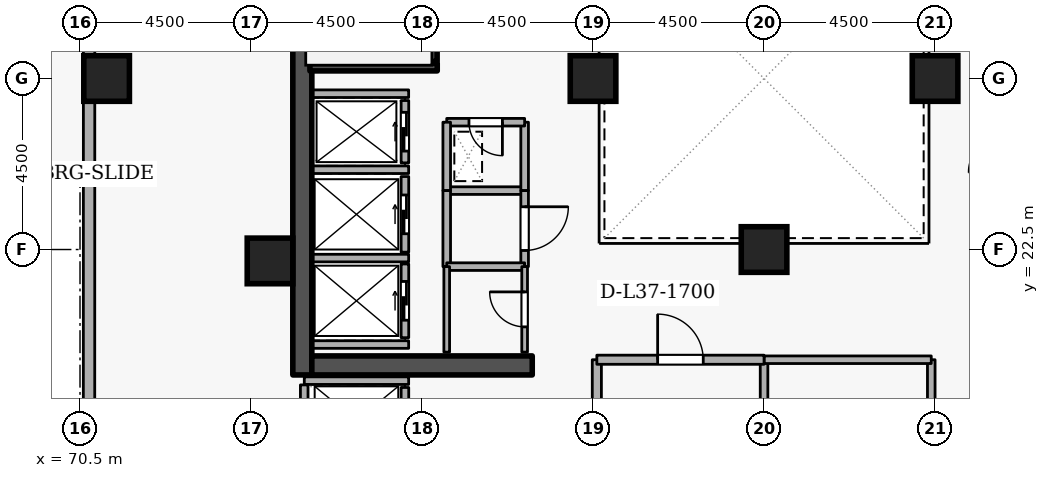
"""IFC4 building model, lengths in metres.
Left out: names, types, materials, properties, quantities, classifications, styles, units other than length and angle.
Written with IfcOpenShell. Run it as: python <this file> out.ifc"""

import sys

from ifc_helpers import new_model, si_unit, direction, frame, frame_2d, origin, origin_2d, place, context, subcontext, project, spatial, rectangle, extrude, element, fill, save


model = new_model("IFC4")
c1 = context("Model", 3, precision=1e-05, world=origin(), true_north=direction((0.0, 1.0)))
c2 = subcontext(c1, "Body", "Model", "MODEL_VIEW")
j1 = project(units=[si_unit("LENGTHUNIT", "METRE"), si_unit("PLANEANGLEUNIT", "RADIAN")], contexts=[c1])
p1 = place(None, origin())
s1 = spatial("IfcSite", under=j1, at=p1, CompositionType="ELEMENT")
p2 = place(p1, origin())
s2 = spatial("IfcBuilding", under=s1, at=p2, CompositionType="ELEMENT")
p3 = place(p2, frame((0.0, 0.0, 141.3)))
s3 = spatial("IfcBuildingStorey", under=s2, at=p3, CompositionType="ELEMENT", Elevation=141.3)
p4 = place(p3, frame((76.35, 19.2, 0.0), z_axis=(0.0, 0.0, 1.0), x_axis=(0.0, 1.0, 0.0)))
e1 = element("IfcWall", 1, at=p4, inside=s3, PredefinedType="SHEAR", context=c2, shape_type="SweptSolid", body=[
    extrude(rectangle(XDim=15.6, YDim=0.5, at=frame_2d((7.8, 0.0))), origin(), (0.0, 0.0, 1.0), 4.2),
])
p5 = place(p3, frame((76.6, 19.45, 0.0), z_axis=(0.0, 0.0, 1.0), x_axis=(1.0, 0.0, 0.0)))
e2 = element("IfcWall", 2, at=p5, inside=s3, PredefinedType="SHEAR", context=c2, shape_type="SweptSolid", body=[
    extrude(rectangle(XDim=5.8, YDim=0.5, at=frame_2d((2.9, 0.0))), origin(), (0.0, 0.0, 1.0), 4.2),
])
for number, where, z_axis, x_axis in (
    (3, (71.2, 27.0, 0.0), (0.0, 0.0, 1.0), (1.0, 0.0, 0.0)),
    (4, (75.5, 22.2, 0.0), (0.0, 0.0, 1.0), (1.0, 0.0, 0.0)),
    (5, (93.0, 27.0, 0.0), (0.0, 0.0, 1.0), (1.0, 0.0, 0.0)),
    (6, (84.0, 27.0, 0.0), (0.0, 0.0, 1.0), (1.0, 0.0, 0.0)),
    (7, (88.5, 22.5, 0.0), (0.0, 0.0, 1.0), (1.0, 0.0, 0.0)),
):
    element("IfcColumn", number, at=place(p3, frame(where, z_axis=z_axis, x_axis=x_axis)), inside=s3, PredefinedType="COLUMN", context=c2, shape_type="SweptSolid", body=[
        extrude(rectangle(XDim=1.2, YDim=1.2, at=origin_2d()), origin(), (0.0, 0.0, 1.0), 4.2),
    ])
p6 = place(p3, frame((70.741, 40.388, 0.0), z_axis=(0.0, 0.0, 1.0), x_axis=(-0.000169493917, -0.999999985636, 0.0)))
e8 = element("IfcWall", 8, at=p6, inside=s3, PredefinedType="STANDARD", context=c2, shape_type="SweptSolid", body=[
    extrude(rectangle(XDim=34.57, YDim=0.3, at=frame_2d((17.285, 0.0))), origin(), (0.0, 0.0, 1.0), 3.3),
])
p7 = place(p6, frame((11.364, 0.0, 0.0)))
e9 = element("IfcOpeningElement", 9, at=p7, cuts=e8, PredefinedType="OPENING", context=c2, shape_type="SweptSolid", body=[
    extrude(rectangle(XDim=1.15, YDim=2.1, at=frame_2d((0.575, 1.05))), frame((0.0, 0.16, 0.0), z_axis=(0.0, -1.0, 0.0), x_axis=(1.0, 0.0, 0.0)), (0.0, 0.0, 1.0), 0.32),
])
p8 = place(p6, frame((7.5, 0.0, 0.72)))
e10 = element("IfcOpeningElement", 10, at=p8, cuts=e8, PredefinedType="OPENING", context=c2, shape_type="SweptSolid", body=[
    extrude(rectangle(XDim=0.9, YDim=1.75, at=frame_2d((0.45, 0.875))), frame((0.0, 0.16, 0.0), z_axis=(0.0, -1.0, 0.0), x_axis=(1.0, 0.0, 0.0)), (0.0, 0.0, 1.0), 0.32),
])
p9 = place(p6, frame((21.9, 0.0, 0.72)))
e11 = element("IfcOpeningElement", 11, at=p9, cuts=e8, PredefinedType="OPENING", context=c2, shape_type="SweptSolid", body=[
    extrude(rectangle(XDim=0.9, YDim=1.75, at=frame_2d((0.45, 0.875))), frame((0.0, 0.16, 0.0), z_axis=(0.0, -1.0, 0.0), x_axis=(1.0, 0.0, 0.0)), (0.0, 0.0, 1.0), 0.32),
])
p10 = place(p6, frame((31.5, 0.0, 0.72)))
e12 = element("IfcOpeningElement", 12, at=p10, cuts=e8, PredefinedType="OPENING", context=c2, shape_type="SweptSolid", body=[
    extrude(rectangle(XDim=0.9, YDim=1.75, at=frame_2d((0.45, 0.875))), frame((0.0, 0.16, 0.0), z_axis=(0.0, -1.0, 0.0), x_axis=(1.0, 0.0, 0.0)), (0.0, 0.0, 1.0), 0.32),
])
p11 = place(p3, frame((79.05, 24.78, 0.0), z_axis=(0.0, 0.0, 1.0), x_axis=(0.0, 1.0, 0.0)))
e13 = element("IfcWall", 13, at=p11, inside=s3, PredefinedType="STANDARD", context=c2, shape_type="SweptSolid", body=[
    extrude(rectangle(XDim=1.64, YDim=0.2, at=frame_2d((0.82, 0.0))), origin(), (0.0, 0.0, 1.0), 3.94),
])
p12 = place(p11, frame((0.31, 0.0, 0.0)))
e14 = element("IfcOpeningElement", 14, at=p12, cuts=e13, PredefinedType="OPENING", context=c2, shape_type="SweptSolid", body=[
    extrude(rectangle(XDim=1.02, YDim=2.06, at=frame_2d((0.51, 1.03))), frame((0.0, 0.11, 0.0), z_axis=(0.0, -1.0, 0.0), x_axis=(1.0, 0.0, 0.0)), (0.0, 0.0, 1.0), 0.22),
])
p13 = place(p3, frame((79.05, 22.43, 0.0), z_axis=(0.0, 0.0, 1.0), x_axis=(0.0, 1.0, 0.0)))
e15 = element("IfcWall", 15, at=p13, inside=s3, PredefinedType="STANDARD", context=c2, shape_type="SweptSolid", body=[
    extrude(rectangle(XDim=1.99, YDim=0.2, at=frame_2d((0.995, 0.0))), origin(), (0.0, 0.0, 1.0), 3.94),
])
p14 = place(p13, frame((0.485, 0.0, 0.0)))
e16 = element("IfcOpeningElement", 16, at=p14, cuts=e15, PredefinedType="OPENING", context=c2, shape_type="SweptSolid", body=[
    extrude(rectangle(XDim=1.02, YDim=2.06, at=frame_2d((0.51, 1.03))), frame((0.0, 0.11, 0.0), z_axis=(0.0, -1.0, 0.0), x_axis=(1.0, 0.0, 0.0)), (0.0, 0.0, 1.0), 0.22),
])
p15 = place(p3, frame((79.05, 20.18, 0.0), z_axis=(0.0, 0.0, 1.0), x_axis=(0.0, 1.0, 0.0)))
e17 = element("IfcWall", 17, at=p15, inside=s3, PredefinedType="STANDARD", context=c2, shape_type="SweptSolid", body=[
    extrude(rectangle(XDim=1.94, YDim=0.2, at=frame_2d((0.97, 0.0))), origin(), (0.0, 0.0, 1.0), 3.94),
])
p16 = place(p15, frame((0.46, 0.0, 0.0)))
e18 = element("IfcOpeningElement", 18, at=p16, cuts=e17, PredefinedType="OPENING", context=c2, shape_type="SweptSolid", body=[
    extrude(rectangle(XDim=1.02, YDim=2.06, at=frame_2d((0.51, 1.03))), frame((0.0, 0.11, 0.0), z_axis=(0.0, -1.0, 0.0), x_axis=(1.0, 0.0, 0.0)), (0.0, 0.0, 1.0), 0.22),
])
p17 = place(p3, frame((79.05, 17.13, 0.0), z_axis=(0.0, 0.0, 1.0), x_axis=(0.0, 1.0, 0.0)))
e19 = element("IfcWall", 19, at=p17, inside=s3, PredefinedType="STANDARD", context=c2, shape_type="SweptSolid", body=[
    extrude(rectangle(XDim=1.74, YDim=0.2, at=frame_2d((0.87, 0.0))), origin(), (0.0, 0.0, 1.0), 3.94),
])
p18 = place(p17, frame((0.36, 0.0, 0.0)))
e20 = element("IfcOpeningElement", 20, at=p18, cuts=e19, PredefinedType="OPENING", context=c2, shape_type="SweptSolid", body=[
    extrude(rectangle(XDim=1.02, YDim=2.06, at=frame_2d((0.51, 1.03))), frame((0.0, 0.11, 0.0), z_axis=(0.0, -1.0, 0.0), x_axis=(1.0, 0.0, 0.0)), (0.0, 0.0, 1.0), 0.22),
])
for number, where, z_axis, x_axis in (
    (21, (76.612, 26.6, 0.0), (0.0, 0.0, 1.0), (1.0, 0.0, 0.0)),
    (22, (76.612, 24.6, 0.0), (0.0, 0.0, 1.0), (1.0, 0.0, 0.0)),
    (23, (76.612, 22.275, 0.0), (0.0, 0.0, 1.0), (1.0, 0.0, 0.0)),
    (24, (76.612, 20.0, 0.0), (0.0, 0.0, 1.0), (1.0, 0.0, 0.0)),
):
    element("IfcWall", number, at=place(p3, frame(where, z_axis=z_axis, x_axis=x_axis)), inside=s3, PredefinedType="STANDARD", context=c2, shape_type="SweptSolid", body=[
        extrude(rectangle(XDim=2.536, YDim=0.2, at=frame_2d((1.268, 0.0))), origin(), (0.0, 0.0, 1.0), 3.94),
    ])
p19 = place(p3, frame((76.402, 19.05, 0.0), z_axis=(0.0, 0.0, 1.0), x_axis=(1.0, 0.0, 0.0)))
e25 = element("IfcWall", 25, at=p19, inside=s3, PredefinedType="STANDARD", context=c2, shape_type="SweptSolid", body=[
    extrude(rectangle(XDim=2.746, YDim=0.2, at=frame_2d((1.373, 0.0))), origin(), (0.0, 0.0, 1.0), 3.145),
])
p20 = place(p3, frame((76.4, 17.082, 0.0), z_axis=(0.0, 0.0, 1.0), x_axis=(0.0, 1.0, 0.0)))
e26 = element("IfcWall", 26, at=p20, inside=s3, PredefinedType="STANDARD", context=c2, shape_type="SweptSolid", body=[
    extrude(rectangle(XDim=1.856, YDim=0.2, at=frame_2d((0.928, 0.0))), origin(), (0.0, 0.0, 1.0), 3.94),
])
p21 = place(p3, frame((79.9, 27.3, 0.0), z_axis=(0.0, 0.0, 1.0), x_axis=(-1.0, 0.0, 0.0)))
e27 = element("IfcWall", 27, at=p21, inside=s3, PredefinedType="SHEAR", context=c2, shape_type="SweptSolid", body=[
    extrude(rectangle(XDim=3.35, YDim=0.2, at=frame_2d((1.675, 0.0))), origin(), (0.0, 0.0, 1.0), 4.2),
])
p22 = place(p3, frame((79.797, 27.45, 0.0), z_axis=(0.0, 0.0, 1.0), x_axis=(0.0, 1.0, 0.0)))
e28 = element("IfcWall", 28, at=p22, inside=s3, PredefinedType="SHEAR", context=c2, shape_type="SweptSolid", body=[
    extrude(rectangle(XDim=7.1, YDim=0.2, at=frame_2d((3.55, 0.0))), origin(), (0.0, 0.0, 1.0), 4.2),
])
p23 = place(p3, frame((80.15, 24.05, 0.0), z_axis=(0.0, 0.0, 1.0), x_axis=(1.0, 0.0, 0.0)))
e29 = element("IfcWall", 29, at=p23, inside=s3, PredefinedType="STANDARD", context=c2, shape_type="SweptSolid", body=[
    extrude(rectangle(XDim=2.05, YDim=0.2, at=frame_2d((1.025, 0.0))), origin(), (0.0, 0.0, 1.0), 3.94),
])
p24 = place(p3, frame((82.2, 24.05, 0.0), z_axis=(0.0, 0.0, 1.0), x_axis=(0.0, 1.0, 0.0)))
e30 = element("IfcWall", 30, at=p24, inside=s3, PredefinedType="STANDARD", context=c2, shape_type="SweptSolid", body=[
    extrude(rectangle(XDim=1.8, YDim=0.2, at=frame_2d((0.9, 0.0))), origin(), (0.0, 0.0, 1.0), 3.94),
])
p25 = place(p3, frame((82.2, 25.85, 0.0), z_axis=(0.0, 0.0, 1.0), x_axis=(-1.0, 0.0, 0.0)))
e31 = element("IfcWall", 31, at=p25, inside=s3, PredefinedType="STANDARD", context=c2, shape_type="SweptSolid", body=[
    extrude(rectangle(XDim=2.05, YDim=0.2, at=frame_2d((1.025, 0.0))), origin(), (0.0, 0.0, 1.0), 3.94),
])
p26 = place(p25, frame((0.585, 0.0, 0.0)))
e32 = element("IfcOpeningElement", 32, at=p26, cuts=e31, PredefinedType="OPENING", context=c2, shape_type="SweptSolid", body=[
    extrude(rectangle(XDim=0.88, YDim=2.04, at=frame_2d((0.44, 1.02))), frame((0.0, 0.11, 0.0), z_axis=(0.0, -1.0, 0.0), x_axis=(1.0, 0.0, 0.0)), (0.0, 0.0, 1.0), 0.22),
])
p27 = place(p3, frame((80.15, 25.85, 0.0), z_axis=(0.0, 0.0, 1.0), x_axis=(0.0, -1.0, 0.0)))
e33 = element("IfcWall", 33, at=p27, inside=s3, PredefinedType="STANDARD", context=c2, shape_type="SweptSolid", body=[
    extrude(rectangle(XDim=1.8, YDim=0.2, at=frame_2d((0.9, 0.0))), origin(), (0.0, 0.0, 1.0), 3.94),
])
p28 = place(p3, frame((80.15, 22.05, 0.0), z_axis=(0.0, 0.0, 1.0), x_axis=(0.0, 1.0, 0.0)))
e34 = element("IfcWall", 34, at=p28, inside=s3, PredefinedType="STANDARD", context=c2, shape_type="SweptSolid", body=[
    extrude(rectangle(XDim=2.0, YDim=0.2, at=frame_2d((1.0, 0.0))), origin(), (0.0, 0.0, 1.0), 3.94),
])
p29 = place(p3, frame((82.2, 24.05, 0.0), z_axis=(0.0, 0.0, 1.0), x_axis=(0.0, -1.0, 0.0)))
e35 = element("IfcWall", 35, at=p29, inside=s3, PredefinedType="STANDARD", context=c2, shape_type="SweptSolid", body=[
    extrude(rectangle(XDim=2.0, YDim=0.2, at=frame_2d((1.0, 0.0))), origin(), (0.0, 0.0, 1.0), 3.94),
])
p30 = place(p29, frame((0.425, 0.0, 0.0)))
e36 = element("IfcOpeningElement", 36, at=p30, cuts=e35, PredefinedType="OPENING", context=c2, shape_type="SweptSolid", body=[
    extrude(rectangle(XDim=1.15, YDim=2.1, at=frame_2d((0.575, 1.05))), frame((0.0, 0.11, 0.0), z_axis=(0.0, -1.0, 0.0), x_axis=(1.0, 0.0, 0.0)), (0.0, 0.0, 1.0), 0.22),
])
p31 = place(p3, frame((82.2, 22.05, 0.0), z_axis=(0.0, 0.0, 1.0), x_axis=(-1.0, 0.0, 0.0)))
e37 = element("IfcWall", 37, at=p31, inside=s3, PredefinedType="STANDARD", context=c2, shape_type="SweptSolid", body=[
    extrude(rectangle(XDim=2.05, YDim=0.2, at=frame_2d((1.025, 0.0))), origin(), (0.0, 0.0, 1.0), 3.94),
])
p32 = place(p3, frame((92.9, 19.6, 0.0), z_axis=(0.0, 0.0, 1.0), x_axis=(0.0, -1.0, 0.0)))
e38 = element("IfcWall", 38, at=p32, inside=s3, PredefinedType="STANDARD", context=c2, shape_type="SweptSolid", body=[
    extrude(rectangle(XDim=2.9, YDim=0.2, at=frame_2d((1.45, 0.0))), origin(), (0.0, 0.0, 1.0), 3.94),
])
p33 = place(p3, frame((88.5, 6.95, 0.0), z_axis=(0.0, 0.0, 1.0), x_axis=(0.0, 1.0, 0.0)))
e39 = element("IfcWall", 39, at=p33, inside=s3, PredefinedType="STANDARD", context=c2, shape_type="SweptSolid", body=[
    extrude(rectangle(XDim=12.65, YDim=0.2, at=frame_2d((6.325, 0.0))), origin(), (0.0, 0.0, 1.0), 3.325),
])
p34 = place(p3, frame((88.5, 19.6, 0.0), z_axis=(0.0, 0.0, 1.0), x_axis=(1.0, 0.0, 0.0)))
e40 = element("IfcWall", 40, at=p34, inside=s3, PredefinedType="STANDARD", context=c2, shape_type="SweptSolid", body=[
    extrude(rectangle(XDim=4.4, YDim=0.2, at=frame_2d((2.2, 0.0))), origin(), (0.0, 0.0, 1.0), 3.145),
])
p35 = place(p3, frame((84.1, 16.7, 0.0), z_axis=(0.0, 0.0, 1.0), x_axis=(0.0, 1.0, 0.0)))
e41 = element("IfcWall", 41, at=p35, inside=s3, PredefinedType="STANDARD", context=c2, shape_type="SweptSolid", body=[
    extrude(rectangle(XDim=2.9, YDim=0.24, at=frame_2d((1.45, 0.0))), origin(), (0.0, 0.0, 1.0), 3.94),
])
p36 = place(p3, frame((84.1, 19.6, 0.0), z_axis=(0.0, 0.0, 1.0), x_axis=(1.0, 0.0, 0.0)))
e42 = element("IfcWall", 42, at=p36, inside=s3, PredefinedType="STANDARD", context=c2, shape_type="SweptSolid", body=[
    extrude(rectangle(XDim=4.4, YDim=0.24, at=frame_2d((2.2, 0.0))), origin(), (0.0, 0.0, 1.0), 3.145),
])
p37 = place(p36, frame((1.6, 0.0, 0.0)))
e43 = element("IfcOpeningElement", 43, at=p37, cuts=e42, PredefinedType="OPENING", context=c2, shape_type="SweptSolid", body=[
    extrude(rectangle(XDim=1.2, YDim=2.1, at=frame_2d((0.6, 1.05))), frame((0.0, 0.13, 0.0), z_axis=(0.0, -1.0, 0.0), x_axis=(1.0, 0.0, 0.0)), (0.0, 0.0, 1.0), 0.26),
])
p38 = place(p3, frame((82.2, 19.8, 0.0), z_axis=(0.0, 0.0, 1.0), x_axis=(0.0, 1.0, 0.0)))
e44 = element("IfcWall", 44, at=p38, inside=s3, PredefinedType="PARTITIONING", context=c2, shape_type="SweptSolid", body=[
    extrude(rectangle(XDim=2.25, YDim=0.15, at=frame_2d((1.125, 0.0))), origin(), (0.0, 0.0, 1.0), 3.94),
])
p39 = place(p38, frame((0.665, 0.0, 0.0)))
e45 = element("IfcOpeningElement", 45, at=p39, cuts=e44, PredefinedType="OPENING", context=c2, shape_type="SweptSolid", body=[
    extrude(rectangle(XDim=0.92, YDim=2.08, at=frame_2d((0.46, 1.04))), frame((0.0, 0.085, 0.0), z_axis=(0.0, -1.0, 0.0), x_axis=(1.0, 0.0, 0.0)), (0.0, 0.0, 1.0), 0.17),
])
p40 = place(p3, frame((80.15, 22.05, 0.0), z_axis=(0.0, 0.0, 1.0), x_axis=(0.0, -1.0, 0.0)))
e46 = element("IfcWall", 46, at=p40, inside=s3, PredefinedType="PARTITIONING", context=c2, shape_type="SweptSolid", body=[
    extrude(rectangle(XDim=2.25, YDim=0.15, at=frame_2d((1.125, 0.0))), origin(), (0.0, 0.0, 1.0), 3.94),
])
p41 = place(p12, origin())
e47 = element("IfcDoor", 47, at=p41, inside=s3, OperationType="SLIDING_TO_LEFT", PredefinedType="DOOR", context=c2, shape_type="SweptSolid", body=[
    extrude(rectangle(XDim=1.02, YDim=2.06, at=frame_2d((0.51, 1.03))), frame((0.0, 0.025, 0.0), z_axis=(0.0, -1.0, 0.0), x_axis=(1.0, 0.0, 0.0)), (0.0, 0.0, 1.0), 0.05),
])
fill(e14, e47)
p42 = place(p14, origin())
e48 = element("IfcDoor", 48, at=p42, inside=s3, OperationType="SLIDING_TO_LEFT", PredefinedType="DOOR", context=c2, shape_type="SweptSolid", body=[
    extrude(rectangle(XDim=1.02, YDim=2.06, at=frame_2d((0.51, 1.03))), frame((0.0, 0.025, 0.0), z_axis=(0.0, -1.0, 0.0), x_axis=(1.0, 0.0, 0.0)), (0.0, 0.0, 1.0), 0.05),
])
fill(e16, e48)
p43 = place(p16, origin())
e49 = element("IfcDoor", 49, at=p43, inside=s3, OperationType="SLIDING_TO_LEFT", PredefinedType="DOOR", context=c2, shape_type="SweptSolid", body=[
    extrude(rectangle(XDim=1.02, YDim=2.06, at=frame_2d((0.51, 1.03))), frame((0.0, 0.025, 0.0), z_axis=(0.0, -1.0, 0.0), x_axis=(1.0, 0.0, 0.0)), (0.0, 0.0, 1.0), 0.05),
])
fill(e18, e49)
p44 = place(p26, origin())
e50 = element("IfcDoor", 50, at=p44, inside=s3, OperationType="SINGLE_SWING_LEFT", PredefinedType="DOOR", context=c2, shape_type="SweptSolid", body=[
    extrude(rectangle(XDim=0.88, YDim=2.04, at=frame_2d((0.44, 1.02))), frame((0.0, 0.025, 0.0), z_axis=(0.0, -1.0, 0.0), x_axis=(1.0, 0.0, 0.0)), (0.0, 0.0, 1.0), 0.05),
])
fill(e32, e50)
p45 = place(p39, origin())
e51 = element("IfcDoor", 51, at=p45, inside=s3, OperationType="SINGLE_SWING_RIGHT", PredefinedType="DOOR", context=c2, shape_type="SweptSolid", body=[
    extrude(rectangle(XDim=0.92, YDim=2.08, at=frame_2d((0.46, 1.04))), frame((0.0, 0.025, 0.0), z_axis=(0.0, -1.0, 0.0), x_axis=(1.0, 0.0, 0.0)), (0.0, 0.0, 1.0), 0.05),
])
fill(e45, e51)
p46 = place(p30, origin())
e52 = element("IfcDoor", 52, at=p46, inside=s3, OperationType="SINGLE_SWING_LEFT", PredefinedType="DOOR", context=c2, shape_type="SweptSolid", body=[
    extrude(rectangle(XDim=1.15, YDim=2.1, at=frame_2d((0.575, 1.05))), frame((0.0, 0.025, 0.0), z_axis=(0.0, -1.0, 0.0), x_axis=(1.0, 0.0, 0.0)), (0.0, 0.0, 1.0), 0.05),
])
fill(e36, e52)
p47 = place(p37, origin())
e53 = element("IfcDoor", 53, at=p47, inside=s3, OperationType="SINGLE_SWING_LEFT", PredefinedType="DOOR", context=c2, shape_type="SweptSolid", body=[
    extrude(rectangle(XDim=1.2, YDim=2.1, at=frame_2d((0.6, 1.05))), frame((0.0, 0.025, 0.0), z_axis=(0.0, -1.0, 0.0), x_axis=(1.0, 0.0, 0.0)), (0.0, 0.0, 1.0), 0.05),
])
fill(e43, e53)
save(model, sys.argv[1])
